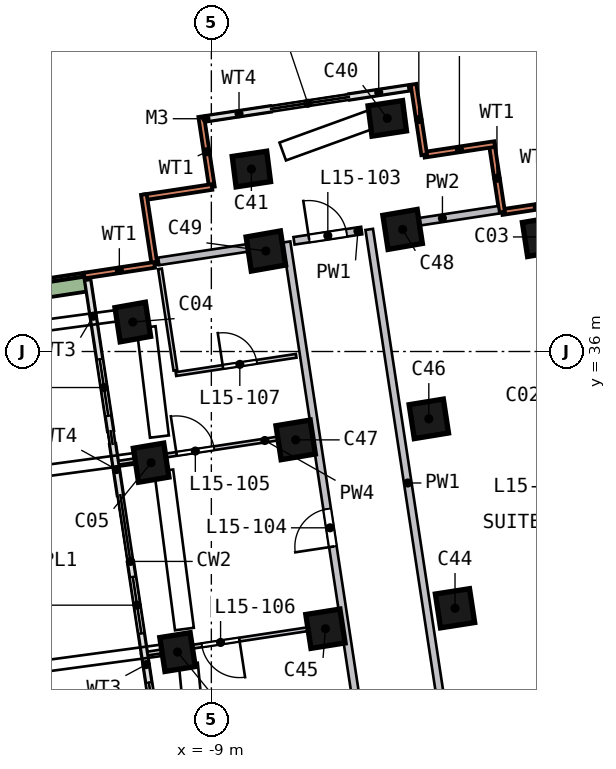
"""IFC4 building model, lengths in metres.
Left out: names, types, materials, properties, quantities, classifications, styles, units other than length and angle.
Written with IfcOpenShell. Run it as: python <this file> out.ifc"""

import sys

from ifc_helpers import new_model, si_unit, direction, frame, frame_2d, origin, origin_2d, place, context, subcontext, project, spatial, rectangle, extrude, element, fill, save


model = new_model("IFC4")
c1 = context("Model", 3, precision=1e-05, world=origin(), true_north=direction((0.0, 1.0)))
c2 = subcontext(c1, "Body", "Model", "MODEL_VIEW")
j1 = project(units=[si_unit("LENGTHUNIT", "METRE"), si_unit("PLANEANGLEUNIT", "RADIAN")], contexts=[c1])
p1 = place(None, origin())
s1 = spatial("IfcSite", under=j1, at=p1, CompositionType="ELEMENT")
p2 = place(p1, origin())
s2 = spatial("IfcBuilding", under=s1, at=p2, CompositionType="ELEMENT")
p3 = place(p2, frame((0.0, 0.0, 68.0)))
s3 = spatial("IfcBuildingStorey", under=s2, at=p3, CompositionType="ELEMENT", Elevation=68.0)
p4 = place(p3, frame((-0.144, 39.159, 0.0), z_axis=(-0.164084546, -0.117610165, 0.979410083), x_axis=(-0.166101117, 0.981984673, 0.090091735)))
e1 = element("IfcColumn", 1, at=p4, inside=s3, PredefinedType="COLUMN", context=c2, shape_type="SweptSolid", body=[
    extrude(rectangle(XDim=0.9, YDim=0.8, at=origin_2d()), origin(), (0.0, 0.0, 1.0), 3.257),
])
p5 = place(p3, frame((-10.879, 36.982, 0.0), z_axis=(-0.152679539, -0.166918695, 0.974077567), x_axis=(0.173524746, -0.974848982, -0.13985215)))
e2 = element("IfcColumn", 2, at=p5, inside=s3, PredefinedType="COLUMN", context=c2, shape_type="SweptSolid", body=[
    extrude(rectangle(XDim=0.9, YDim=0.8, at=origin_2d()), origin(), (0.0, 0.0, 1.0), 3.275),
])
p6 = place(p3, frame((-10.41, 33.23, 0.0), z_axis=(-0.142658539, -0.127258328, 0.981556855), x_axis=(0.166014543, -0.98072706, -0.10302235)))
e3 = element("IfcColumn", 3, at=p6, inside=s3, PredefinedType="COLUMN", context=c2, shape_type="SweptSolid", body=[
    extrude(rectangle(XDim=0.9, YDim=0.8, at=origin_2d()), origin(), (0.0, 0.0, 1.0), 3.25),
])
p7 = place(p3, frame((-9.736, 28.195, 0.0), z_axis=(-0.126460455, -0.085996135, 0.988237025), x_axis=(0.158944012, -0.985120062, -0.065385514)))
e4 = element("IfcColumn", 4, at=p7, inside=s3, PredefinedType="COLUMN", context=c2, shape_type="SweptSolid", body=[
    extrude(rectangle(XDim=0.9, YDim=0.8, at=origin_2d()), origin(), (0.0, 0.0, 1.0), 3.228),
])
p8 = place(p3, frame((-4.152, 42.302, 0.0), z_axis=(-0.177759072, -0.135836874, 0.974653813), x_axis=(-0.972656429, -0.126182341, -0.194980737)))
e5 = element("IfcColumn", 5, at=p8, inside=s3, PredefinedType="COLUMN", context=c2, shape_type="SweptSolid", body=[
    extrude(rectangle(XDim=0.9, YDim=0.8, at=origin_2d()), origin(), (0.0, 0.0, 1.0), 3.273),
])
p9 = place(p3, frame((-7.735, 40.989, 0.0), z_axis=(-0.171342284, -0.152271143, 0.973373166), x_axis=(-0.973904016, -0.123078782, -0.19068975)))
e6 = element("IfcColumn", 6, at=p9, inside=s3, PredefinedType="COLUMN", context=c2, shape_type="SweptSolid", body=[
    extrude(rectangle(XDim=0.9, YDim=0.8, at=origin_2d()), origin(), (0.0, 0.0, 1.0), 3.277),
])
p10 = place(p3, frame((-2.428, 29.305, 0.0), z_axis=(-0.132201605, -0.051516958, 0.989883194), x_axis=(-0.154308616, 0.987542922, 0.030786825)))
e7 = element("IfcColumn", 7, at=p10, inside=s3, PredefinedType="COLUMN", context=c2, shape_type="SweptSolid", body=[
    extrude(rectangle(XDim=0.9, YDim=0.9, at=origin_2d()), origin(), (0.0, 0.0, 1.0), 3.223),
])
p11 = place(p3, frame((-5.841, 28.787, 0.0), z_axis=(-0.129544243, -0.067687056, 0.98926071), x_axis=(-0.156761028, 0.986518959, 0.046971516)))
e8 = element("IfcColumn", 8, at=p11, inside=s3, PredefinedType="COLUMN", context=c2, shape_type="SweptSolid", body=[
    extrude(rectangle(XDim=0.9, YDim=0.9, at=origin_2d()), origin(), (0.0, 0.0, 1.0), 3.225),
])
p12 = place(p3, frame((-3.096, 34.342, 0.0), z_axis=(-0.148658938, -0.093279151, 0.984479314), x_axis=(-0.161106511, 0.984525146, 0.068955991)))
e9 = element("IfcColumn", 9, at=p12, inside=s3, PredefinedType="COLUMN", context=c2, shape_type="SweptSolid", body=[
    extrude(rectangle(XDim=0.9, YDim=0.9, at=origin_2d()), origin(), (0.0, 0.0, 1.0), 3.24),
])
p13 = place(p3, frame((-6.604, 33.809, 0.0), z_axis=(-0.14583427, -0.109639077, 0.98321495), x_axis=(-0.163460081, 0.982850749, 0.085353429)))
e10 = element("IfcColumn", 10, at=p13, inside=s3, PredefinedType="COLUMN", context=c2, shape_type="SweptSolid", body=[
    extrude(rectangle(XDim=0.9, YDim=0.9, at=origin_2d()), origin(), (0.0, 0.0, 1.0), 3.244),
])
p14 = place(p3, frame((-3.765, 39.377, 0.0), z_axis=(-0.164608531, -0.134244576, 0.977180856), x_axis=(-0.168918924, 0.979895845, 0.10616275)))
e11 = element("IfcColumn", 11, at=p14, inside=s3, PredefinedType="COLUMN", context=c2, shape_type="SweptSolid", body=[
    extrude(rectangle(XDim=0.9, YDim=0.9, at=origin_2d()), origin(), (0.0, 0.0, 1.0), 3.264),
])
p15 = place(p3, frame((-7.367, 38.83, 0.0), z_axis=(-0.161526881, -0.150778327, 0.975281991), x_axis=(-0.171853009, 0.977457402, 0.12265223)))
e12 = element("IfcColumn", 12, at=p15, inside=s3, PredefinedType="COLUMN", context=c2, shape_type="SweptSolid", body=[
    extrude(rectangle(XDim=0.9, YDim=0.9, at=origin_2d()), origin(), (0.0, 0.0, 1.0), 3.271),
])
p16 = place(p3, frame((0.504, 39.95, 0.0), z_axis=(0.0, 0.0, 1.0), x_axis=(-0.98866636, -0.150129371, 0.0)))
e13 = element("IfcWall", 13, at=p16, inside=s3, PredefinedType="SOLIDWALL", context=c2, shape_type="SweptSolid", body=[
    extrude(rectangle(XDim=1.875, YDim=0.15, at=frame_2d((0.938, 0.0))), origin(), (0.0, 0.0, 1.0), 3.19),
])
p17 = place(p3, frame((-1.35, 39.669, 0.0), z_axis=(0.0, 0.0, 1.0), x_axis=(-0.150150918, 0.988663088, 0.0)))
e14 = element("IfcWall", 14, at=p17, inside=s3, PredefinedType="SOLIDWALL", context=c2, shape_type="SweptSolid", body=[
    extrude(rectangle(XDim=1.8, YDim=0.15, at=frame_2d((0.9, 0.0))), origin(), (0.0, 0.0, 1.0), 3.19),
])
for number, where, z_axis, x_axis in (
    (15, (-1.546, 41.459, 0.0), (0.0, 0.0, 1.0), (-0.989, -0.15, 0.0)),
    (16, (-3.4, 41.178, 0.0), (0.0, 0.0, 1.0), (-0.15, 0.989, 0.0)),
    (17, (-9.267, 42.183, 0.0), (0.0, 0.0, 1.0), (0.15, -0.989, 0.0)),
):
    element("IfcWall", number, at=place(p3, frame(where, z_axis=z_axis, x_axis=x_axis)), inside=s3, PredefinedType="SOLIDWALL", context=c2, shape_type="SweptSolid", body=[
        extrude(rectangle(XDim=1.875, YDim=0.15, at=frame_2d((0.938, 0.0))), origin(), (0.0, 0.0, 1.0), 3.19),
    ])
p18 = place(p3, frame((-8.985, 40.329, 0.0), z_axis=(0.0, 0.0, 1.0), x_axis=(-0.988642944, -0.150283493, 0.0)))
e18 = element("IfcWall", 18, at=p18, inside=s3, PredefinedType="SOLIDWALL", context=c2, shape_type="SweptSolid", body=[
    extrude(rectangle(XDim=1.8, YDim=0.15, at=frame_2d((0.9, 0.0))), origin(), (0.0, 0.0, 1.0), 3.19),
])
for number, where, z_axis, x_axis in (
    (19, (-10.776, 40.133, 0.0), (0.0, 0.0, 1.0), (0.15, -0.989, 0.0)),
    (20, (-10.495, 38.279, 0.0), (0.0, 0.0, 1.0), (-0.989, -0.15, 0.0)),
):
    element("IfcWall", number, at=place(p3, frame(where, z_axis=z_axis, x_axis=x_axis)), inside=s3, PredefinedType="SOLIDWALL", context=c2, shape_type="SweptSolid", body=[
        extrude(rectangle(XDim=1.875, YDim=0.15, at=frame_2d((0.938, 0.0))), origin(), (0.0, 0.0, 1.0), 3.19),
    ])
p19 = place(p3, frame((-3.823, 42.934, 0.0), z_axis=(0.0, 0.0, 1.0), x_axis=(-0.988653682, -0.150212836, 0.0)))
e21 = element("IfcWall", 21, at=p19, inside=s3, PredefinedType="SOLIDWALL", context=c2, shape_type="SweptSolid", body=[
    extrude(rectangle(XDim=1.562, YDim=0.15, at=frame_2d((0.781, 0.0))), origin(), (0.0, 0.0, 1.0), 2.425),
])
p20 = place(p3, frame((-7.442, 42.384, 0.0), z_axis=(0.0, 0.0, 1.0), x_axis=(-0.988645604, -0.150265994, 0.0)))
e22 = element("IfcWall", 22, at=p20, inside=s3, PredefinedType="SOLIDWALL", context=c2, shape_type="SweptSolid", body=[
    extrude(rectangle(XDim=1.68, YDim=0.15, at=frame_2d((0.84, 0.0))), origin(), (0.0, 0.0, 1.0), 2.425),
])
p21 = place(p3, frame((-12.252, 37.865, 0.0), z_axis=(0.0, 0.0, 1.0), x_axis=(0.150261525, -0.988646284, 0.0)))
e23 = element("IfcWall", 23, at=p21, inside=s3, PredefinedType="SOLIDWALL", context=c2, shape_type="SweptSolid", body=[
    extrude(rectangle(XDim=3.995, YDim=0.15, at=frame_2d((1.998, 0.0))), origin(), (0.0, 0.0, 1.0), 2.425),
])
p22 = place(p21, frame((2.095, 0.0, 0.0)))
e24 = element("IfcOpeningElement", 24, at=p22, cuts=e23, PredefinedType="OPENING", context=c2, shape_type="SweptSolid", body=[
    extrude(rectangle(XDim=1.5, YDim=2.4, at=frame_2d((0.75, 1.2))), frame((0.0, 0.085, 0.0), z_axis=(0.0, -1.0, 0.0), x_axis=(1.0, 0.0, 0.0)), (0.0, 0.0, 1.0), 0.17),
])
p23 = place(p3, frame((-11.127, 30.462, 0.0), z_axis=(0.0, 0.0, 1.0), x_axis=(0.150274727, -0.988644277, 0.0)))
e25 = element("IfcWall", 25, at=p23, inside=s3, PredefinedType="SOLIDWALL", context=c2, shape_type="SweptSolid", body=[
    extrude(rectangle(XDim=2.45, YDim=0.15, at=frame_2d((1.225, 0.0))), origin(), (0.0, 0.0, 1.0), 2.425),
])
p24 = place(p23, frame((0.4, 0.0, 0.0)))
e26 = element("IfcOpeningElement", 26, at=p24, cuts=e25, PredefinedType="OPENING", context=c2, shape_type="SweptSolid", body=[
    extrude(rectangle(XDim=1.5, YDim=2.4, at=frame_2d((0.75, 1.2))), frame((0.0, 0.085, 0.0), z_axis=(0.0, -1.0, 0.0), x_axis=(1.0, 0.0, 0.0)), (0.0, 0.0, 1.0), 0.17),
])
p25 = place(p3, frame((-10.759, 28.04, 0.0), z_axis=(0.0, 0.0, 1.0), x_axis=(0.150169285, -0.988660299, 0.0)))
e27 = element("IfcWall", 27, at=p25, inside=s3, PredefinedType="SOLIDWALL", context=c2, shape_type="SweptSolid", body=[
    extrude(rectangle(XDim=2.663, YDim=0.15, at=frame_2d((1.332, 0.0))), origin(), (0.0, 0.0, 1.0), 2.425),
])
p26 = place(p25, frame((0.763, 0.0, 0.0)))
e28 = element("IfcOpeningElement", 28, at=p26, cuts=e27, PredefinedType="OPENING", context=c2, shape_type="SweptSolid", body=[
    extrude(rectangle(XDim=1.5, YDim=2.4, at=frame_2d((0.75, 1.2))), frame((0.0, 0.085, 0.0), z_axis=(0.0, -1.0, 0.0), x_axis=(1.0, 0.0, 0.0)), (0.0, 0.0, 1.0), 0.17),
])
p27 = place(p3, frame((-11.597, 33.555, 0.0), z_axis=(0.0, 0.0, 1.0), x_axis=(0.150221204, -0.988652411, 0.0)))
e29 = element("IfcWall", 29, at=p27, inside=s3, PredefinedType="SOLIDWALL", context=c2, shape_type="SweptSolid", body=[
    extrude(rectangle(XDim=1.339, YDim=0.15, at=frame_2d((0.669, 0.0))), origin(), (0.0, 0.0, 1.0), 2.425),
])
p28 = place(p3, frame((-12.323, 37.824, 0.0), z_axis=(0.0, 0.0, 1.0), x_axis=(-0.988655822, -0.150198754, 0.0)))
e30 = element("IfcWall", 30, at=p28, inside=s3, PredefinedType="SOLIDWALL", context=c2, shape_type="SweptSolid", body=[
    extrude(rectangle(XDim=3.199, YDim=0.5, at=frame_2d((1.6, 0.0))), origin(), (0.0, 0.0, 1.0), 0.7),
])
p29 = place(p3, frame((-15.201, 37.134, 0.0), z_axis=(0.0, 0.0, 1.0), x_axis=(0.150217083, -0.988653037, 0.0)))
e31 = element("IfcWall", 31, at=p29, inside=s3, PredefinedType="SOLIDWALL", context=c2, shape_type="SweptSolid", body=[
    extrude(rectangle(XDim=14.738, YDim=0.5, at=frame_2d((7.369, 0.0))), origin(), (0.0, 0.0, 1.0), 0.7),
])
p30 = place(p3, frame((-6.825, 38.913, 0.0), z_axis=(0.0, 0.0, 1.0), x_axis=(0.988667412, 0.150122447, 0.0)))
e32 = element("IfcWall", 32, at=p30, inside=s3, PredefinedType="SOLIDWALL", context=c2, shape_type="SweptSolid", body=[
    extrude(rectangle(XDim=1.802, YDim=0.2, at=frame_2d((0.901, 0.0))), origin(), (0.0, 0.0, 1.0), 3.19),
])
p31 = place(p30, frame((0.4, 0.0, 0.0)))
e33 = element("IfcOpeningElement", 33, at=p31, cuts=e32, PredefinedType="OPENING", context=c2, shape_type="SweptSolid", body=[
    extrude(rectangle(XDim=1.0, YDim=2.1, at=frame_2d((0.5, 1.05))), frame((0.0, 0.11, 0.0), z_axis=(0.0, -1.0, 0.0), x_axis=(1.0, 0.0, 0.0)), (0.0, 0.0, 1.0), 0.22),
])
p32 = place(p3, frame((-3.785, 17.589, 0.0), z_axis=(0.0, 0.0, 1.0), x_axis=(-0.150228123, 0.98865136, 0.0)))
e34 = element("IfcWall", 34, at=p32, inside=s3, PredefinedType="SOLIDWALL", context=c2, shape_type="SweptSolid", body=[
    extrude(rectangle(XDim=21.538, YDim=0.2, at=frame_2d((10.769, 0.0))), origin(), (0.0, 0.0, 1.0), 3.19),
])
p33 = place(p32, frame((13.429, 0.0, 0.0)))
e35 = element("IfcOpeningElement", 35, at=p33, cuts=e34, PredefinedType="OPENING", context=c2, shape_type="SweptSolid", body=[
    extrude(rectangle(XDim=1.0, YDim=2.1, at=frame_2d((0.5, 1.05))), frame((0.0, 0.11, 0.0), z_axis=(0.0, -1.0, 0.0), x_axis=(1.0, 0.0, 0.0)), (0.0, 0.0, 1.0), 0.22),
])
p34 = place(p3, frame((-4.846, 39.213, 0.0), z_axis=(0.0, 0.0, 1.0), x_axis=(0.150218727, -0.988652787, 0.0)))
e36 = element("IfcWall", 36, at=p34, inside=s3, PredefinedType="SOLIDWALL", context=c2, shape_type="SweptSolid", body=[
    extrude(rectangle(XDim=21.538, YDim=0.2, at=frame_2d((10.769, 0.0))), origin(), (0.0, 0.0, 1.0), 3.19),
])
p35 = place(p34, frame((13.7, 0.0, 0.0)))
e37 = element("IfcOpeningElement", 37, at=p35, cuts=e36, PredefinedType="OPENING", context=c2, shape_type="SweptSolid", body=[
    extrude(rectangle(XDim=1.0, YDim=2.1, at=frame_2d((0.5, 1.05))), frame((0.0, 0.11, 0.0), z_axis=(0.0, -1.0, 0.0), x_axis=(1.0, 0.0, 0.0)), (0.0, 0.0, 1.0), 0.22),
])
p36 = place(p3, frame((-7.217, 38.853, 0.0), z_axis=(0.0, 0.0, 1.0), x_axis=(-0.988646659, -0.150259053, 0.0)))
e38 = element("IfcWall", 38, at=p36, inside=s3, PredefinedType="SOLIDWALL", context=c2, shape_type="SweptSolid", body=[
    extrude(rectangle(XDim=3.204, YDim=0.2, at=frame_2d((1.602, 0.0))), origin(), (0.0, 0.0, 1.0), 3.19),
])
p37 = place(p3, frame((-1.435, 39.731, 0.0), z_axis=(0.0, 0.0, 1.0), x_axis=(-0.988660334, -0.150169049, 0.0)))
e39 = element("IfcWall", 39, at=p37, inside=s3, PredefinedType="SOLIDWALL", context=c2, shape_type="SweptSolid", body=[
    extrude(rectangle(XDim=3.003, YDim=0.2, at=frame_2d((1.501, 0.0))), origin(), (0.0, 0.0, 1.0), 3.19),
])
p38 = place(p3, frame((-10.352, 38.174, 0.0), z_axis=(0.0, 0.0, 1.0), x_axis=(0.150276776, -0.988643966, 0.0)))
e40 = element("IfcWall", 40, at=p38, inside=s3, PredefinedType="PARTITIONING", context=c2, shape_type="SweptSolid", body=[
    extrude(rectangle(XDim=2.7, YDim=0.1, at=frame_2d((1.35, 0.0))), origin(), (0.0, 0.0, 1.0), 3.19),
])
p39 = place(p3, frame((-11.448, 33.073, 0.0), z_axis=(0.0, 0.0, 1.0), x_axis=(0.988654449, 0.150207793, 0.0)))
e41 = element("IfcWall", 41, at=p39, inside=s3, PredefinedType="PARTITIONING", context=c2, shape_type="SweptSolid", body=[
    extrude(rectangle(XDim=5.05, YDim=0.1, at=frame_2d((2.525, 0.0))), origin(), (0.0, 0.0, 1.0), 3.19),
])
p40 = place(p39, frame((1.55, 0.0, 0.0)))
e42 = element("IfcOpeningElement", 42, at=p40, cuts=e41, PredefinedType="OPENING", context=c2, shape_type="SweptSolid", body=[
    extrude(rectangle(XDim=1.0, YDim=2.1, at=frame_2d((0.5, 1.05))), frame((0.0, 0.06, 0.0), z_axis=(0.0, -1.0, 0.0), x_axis=(1.0, 0.0, 0.0)), (0.0, 0.0, 1.0), 0.12),
])
p41 = place(p3, frame((-9.932, 35.406, 0.0), z_axis=(0.0, 0.0, 1.0), x_axis=(0.988653098, 0.15021668, 0.0)))
e43 = element("IfcWall", 43, at=p41, inside=s3, PredefinedType="PARTITIONING", context=c2, shape_type="SweptSolid", body=[
    extrude(rectangle(XDim=3.2, YDim=0.1, at=frame_2d((1.6, 0.0))), origin(), (0.0, 0.0, 1.0), 3.19),
])
p42 = place(p41, frame((1.25, 0.0, 0.0)))
e44 = element("IfcOpeningElement", 44, at=p42, cuts=e43, PredefinedType="OPENING", context=c2, shape_type="SweptSolid", body=[
    extrude(rectangle(XDim=0.9, YDim=2.1, at=frame_2d((0.45, 1.05))), frame((0.0, 0.06, 0.0), z_axis=(0.0, -1.0, 0.0), x_axis=(1.0, 0.0, 0.0)), (0.0, 0.0, 1.0), 0.12),
])
p43 = place(p3, frame((-5.692, 28.809, 0.0), z_axis=(0.0, 0.0, 1.0), x_axis=(-0.988655539, -0.150200614, 0.0)))
e45 = element("IfcWall", 45, at=p43, inside=s3, PredefinedType="PARTITIONING", context=c2, shape_type="SweptSolid", body=[
    extrude(rectangle(XDim=5.05, YDim=0.1, at=frame_2d((2.525, 0.0))), origin(), (0.0, 0.0, 1.0), 3.19),
])
p44 = place(p43, frame((2.6, 0.0, 0.0)))
e46 = element("IfcOpeningElement", 46, at=p44, cuts=e45, PredefinedType="OPENING", context=c2, shape_type="SweptSolid", body=[
    extrude(rectangle(XDim=1.0, YDim=2.1, at=frame_2d((0.5, 1.05))), frame((0.0, 0.06, 0.0), z_axis=(0.0, -1.0, 0.0), x_axis=(1.0, 0.0, 0.0)), (0.0, 0.0, 1.0), 0.12),
])
p45 = place(p22, origin())
e47 = element("IfcDoor", 47, at=p45, inside=s3, OperationType="SLIDING_TO_LEFT", PredefinedType="DOOR", context=c2, shape_type="SweptSolid", body=[
    extrude(rectangle(XDim=1.5, YDim=2.4, at=frame_2d((0.75, 1.2))), frame((0.0, 0.025, 0.0), z_axis=(0.0, -1.0, 0.0), x_axis=(1.0, 0.0, 0.0)), (0.0, 0.0, 1.0), 0.05),
])
fill(e24, e47)
p46 = place(p24, origin())
e48 = element("IfcDoor", 48, at=p46, inside=s3, OperationType="SLIDING_TO_RIGHT", PredefinedType="DOOR", context=c2, shape_type="SweptSolid", body=[
    extrude(rectangle(XDim=1.5, YDim=2.4, at=frame_2d((0.75, 1.2))), frame((0.0, 0.025, 0.0), z_axis=(0.0, -1.0, 0.0), x_axis=(1.0, 0.0, 0.0)), (0.0, 0.0, 1.0), 0.05),
])
fill(e26, e48)
p47 = place(p26, origin())
e49 = element("IfcDoor", 49, at=p47, inside=s3, OperationType="SLIDING_TO_LEFT", PredefinedType="DOOR", context=c2, shape_type="SweptSolid", body=[
    extrude(rectangle(XDim=1.5, YDim=2.4, at=frame_2d((0.75, 1.2))), frame((0.0, 0.025, 0.0), z_axis=(0.0, -1.0, 0.0), x_axis=(1.0, 0.0, 0.0)), (0.0, 0.0, 1.0), 0.05),
])
fill(e28, e49)
p48 = place(p31, origin())
e50 = element("IfcDoor", 50, at=p48, inside=s3, OperationType="SINGLE_SWING_LEFT", PredefinedType="DOOR", context=c2, shape_type="SweptSolid", body=[
    extrude(rectangle(XDim=1.0, YDim=2.1, at=frame_2d((0.5, 1.05))), frame((0.0, 0.025, 0.0), z_axis=(0.0, -1.0, 0.0), x_axis=(1.0, 0.0, 0.0)), (0.0, 0.0, 1.0), 0.05),
])
fill(e33, e50)
p49 = place(p33, origin())
e51 = element("IfcDoor", 51, at=p49, inside=s3, OperationType="SINGLE_SWING_LEFT", PredefinedType="DOOR", context=c2, shape_type="SweptSolid", body=[
    extrude(rectangle(XDim=1.0, YDim=2.1, at=frame_2d((0.5, 1.05))), frame((0.0, 0.025, 0.0), z_axis=(0.0, -1.0, 0.0), x_axis=(1.0, 0.0, 0.0)), (0.0, 0.0, 1.0), 0.05),
])
fill(e35, e51)
p50 = place(p40, origin())
e52 = element("IfcDoor", 52, at=p50, inside=s3, OperationType="SINGLE_SWING_LEFT", PredefinedType="DOOR", context=c2, shape_type="SweptSolid", body=[
    extrude(rectangle(XDim=1.0, YDim=2.1, at=frame_2d((0.5, 1.05))), frame((0.0, 0.025, 0.0), z_axis=(0.0, -1.0, 0.0), x_axis=(1.0, 0.0, 0.0)), (0.0, 0.0, 1.0), 0.05),
])
fill(e42, e52)
p51 = place(p44, origin())
e53 = element("IfcDoor", 53, at=p51, inside=s3, OperationType="SINGLE_SWING_LEFT", PredefinedType="DOOR", context=c2, shape_type="SweptSolid", body=[
    extrude(rectangle(XDim=1.0, YDim=2.1, at=frame_2d((0.5, 1.05))), frame((0.0, 0.025, 0.0), z_axis=(0.0, -1.0, 0.0), x_axis=(1.0, 0.0, 0.0)), (0.0, 0.0, 1.0), 0.05),
])
fill(e46, e53)
p52 = place(p42, origin())
e54 = element("IfcDoor", 54, at=p52, inside=s3, OperationType="SINGLE_SWING_LEFT", PredefinedType="DOOR", context=c2, shape_type="SweptSolid", body=[
    extrude(rectangle(XDim=0.9, YDim=2.1, at=frame_2d((0.45, 1.05))), frame((0.0, 0.025, 0.0), z_axis=(0.0, -1.0, 0.0), x_axis=(1.0, 0.0, 0.0)), (0.0, 0.0, 1.0), 0.05),
])
fill(e44, e54)
save(model, sys.argv[1])
